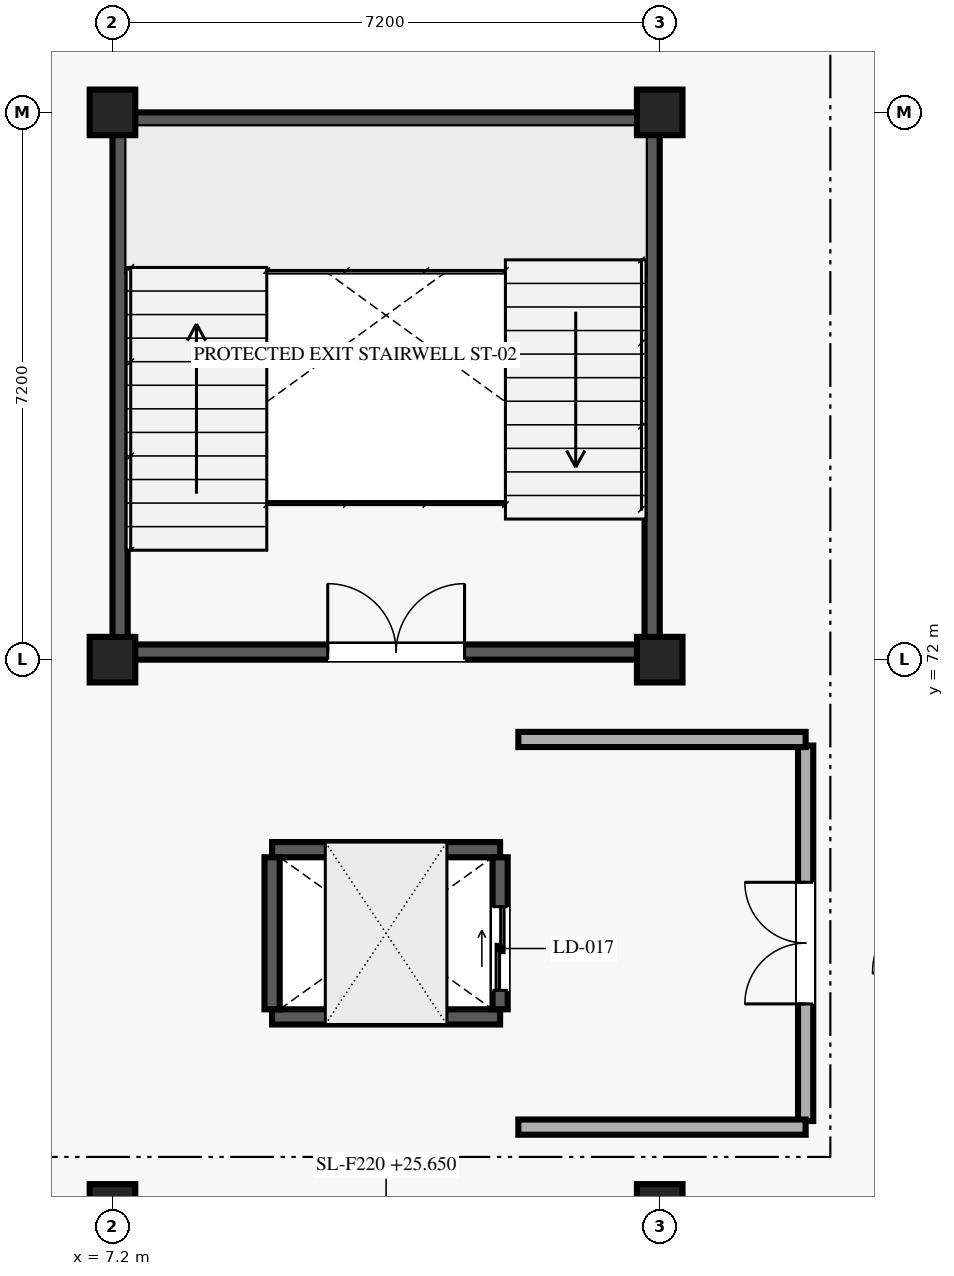
"""IFC4 building model, lengths in metres.
Left out: names, types, materials, properties, quantities, classifications, styles, units other than length and angle.
Written with IfcOpenShell. Run it as: python <this file> out.ifc"""

import sys

from ifc_helpers import new_model, si_unit, direction, frame, frame_2d, origin, origin_2d, place, context, subcontext, project, spatial, rectangle, extrude, element, fill, save


model = new_model("IFC4")
c1 = context("Model", 3, precision=1e-05, world=origin(), true_north=direction((0.0, 1.0)))
c2 = subcontext(c1, "Body", "Model", "MODEL_VIEW")
j1 = project(units=[si_unit("LENGTHUNIT", "METRE"), si_unit("PLANEANGLEUNIT", "RADIAN")], contexts=[c1])
p1 = place(None, origin())
s1 = spatial("IfcSite", under=j1, at=p1, CompositionType="ELEMENT")
p2 = place(p1, origin())
s2 = spatial("IfcBuilding", under=s1, at=p2, CompositionType="ELEMENT")
p3 = place(p2, frame((0.0, 0.0, 25.65)))
s3 = spatial("IfcBuildingStorey", under=s2, at=p3, CompositionType="ELEMENT", Elevation=25.65)
for number, where, z_axis, x_axis in (
    (1, (7.2, 64.8, 0.0), (0.0, 0.0, 1.0), (1.0, 0.0, 0.0)),
    (2, (7.2, 72.0, 0.0), (0.0, 0.0, 1.0), (1.0, 0.0, 0.0)),
    (3, (7.2, 79.2, 0.0), (0.0, 0.0, 1.0), (1.0, 0.0, 0.0)),
    (4, (14.4, 64.8, 0.0), (0.0, 0.0, 1.0), (1.0, 0.0, 0.0)),
    (5, (14.4, 72.0, 0.0), (0.0, 0.0, 1.0), (1.0, 0.0, 0.0)),
    (6, (14.4, 79.2, 0.0), (0.0, 0.0, 1.0), (1.0, 0.0, 0.0)),
):
    element("IfcColumn", number, at=place(p3, frame(where, z_axis=z_axis, x_axis=x_axis)), inside=s3, PredefinedType="COLUMN", context=c2, shape_type="SweptSolid", body=[
        extrude(rectangle(XDim=0.6, YDim=0.6, at=origin_2d()), origin(), (0.0, 0.0, 1.0), 4.05),
    ])
p4 = place(p3, frame((7.4, 72.1, 0.0), z_axis=(0.0, 0.0, 1.0), x_axis=(1.0, 0.0, 0.0)))
e7 = element("IfcWall", 7, at=p4, inside=s3, PredefinedType="SHEAR", context=c2, shape_type="SweptSolid", body=[
    extrude(rectangle(XDim=6.8, YDim=0.2, at=frame_2d((3.4, 0.0))), origin(), (0.0, 0.0, 1.0), 3.83),
])
p5 = place(p4, frame((2.632, 0.0, 0.0)))
e8 = element("IfcOpeningElement", 8, at=p5, cuts=e7, PredefinedType="OPENING", context=c2, shape_type="SweptSolid", body=[
    extrude(rectangle(XDim=1.8, YDim=2.2, at=frame_2d((0.9, 1.1))), frame((0.0, 0.11, 0.0), z_axis=(0.0, -1.0, 0.0), x_axis=(1.0, 0.0, 0.0)), (0.0, 0.0, 1.0), 0.22),
])
for number, where, z_axis, x_axis in (
    (9, (7.4, 79.1, 0.0), (0.0, 0.0, 1.0), (1.0, 0.0, 0.0)),
    (10, (7.3, 72.2, 0.0), (0.0, 0.0, 1.0), (0.0, 1.0, 0.0)),
    (11, (14.3, 72.2, 0.0), (0.0, 0.0, 1.0), (0.0, 1.0, 0.0)),
):
    element("IfcWall", number, at=place(p3, frame(where, z_axis=z_axis, x_axis=x_axis)), inside=s3, PredefinedType="SHEAR", context=c2, shape_type="SweptSolid", body=[
        extrude(rectangle(XDim=6.8, YDim=0.2, at=frame_2d((3.4, 0.0))), origin(), (0.0, 0.0, 1.0), 3.83),
    ])
for number, where, z_axis, x_axis in (
    (12, (9.3, 67.3, 0.0), (0.0, 0.0, 1.0), (1.0, 0.0, 0.0)),
    (13, (9.3, 69.5, 0.0), (0.0, 0.0, 1.0), (1.0, 0.0, 0.0)),
):
    element("IfcWall", number, at=place(p3, frame(where, z_axis=z_axis, x_axis=x_axis)), inside=s3, PredefinedType="SHEAR", context=c2, shape_type="SweptSolid", body=[
        extrude(rectangle(XDim=3.0, YDim=0.2, at=frame_2d((1.5, 0.0))), origin(), (0.0, 0.0, 1.0), 3.83),
    ])
p6 = place(p3, frame((9.3, 67.4, 0.0), z_axis=(0.0, 0.0, 1.0), x_axis=(0.0, 1.0, 0.0)))
e14 = element("IfcWall", 14, at=p6, inside=s3, PredefinedType="SHEAR", context=c2, shape_type="SweptSolid", body=[
    extrude(rectangle(XDim=2.0, YDim=0.2, at=frame_2d((1.0, 0.0))), origin(), (0.0, 0.0, 1.0), 3.83),
])
p7 = place(p3, frame((12.3, 67.4, 0.0), z_axis=(0.0, 0.0, 1.0), x_axis=(0.0, 1.0, 0.0)))
e15 = element("IfcWall", 15, at=p7, inside=s3, PredefinedType="SHEAR", context=c2, shape_type="SweptSolid", body=[
    extrude(rectangle(XDim=2.0, YDim=0.2, at=frame_2d((1.0, 0.0))), origin(), (0.0, 0.0, 1.0), 3.83),
])
p8 = place(p7, frame((0.25, 0.0, 0.0)))
e16 = element("IfcOpeningElement", 16, at=p8, cuts=e15, PredefinedType="OPENING", context=c2, shape_type="SweptSolid", body=[
    extrude(rectangle(XDim=1.1, YDim=2.15, at=frame_2d((0.55, 1.075))), frame((0.0, 0.11, 0.0), z_axis=(0.0, -1.0, 0.0), x_axis=(1.0, 0.0, 0.0)), (0.0, 0.0, 1.0), 0.22),
])
p9 = place(p3, frame((16.32, 65.93, 0.0), z_axis=(0.0, 0.0, 1.0), x_axis=(0.0, 1.0, 0.0)))
e17 = element("IfcWall", 17, at=p9, inside=s3, PredefinedType="SOLIDWALL", context=c2, shape_type="SweptSolid", body=[
    extrude(rectangle(XDim=4.94, YDim=0.2, at=frame_2d((2.47, 0.0))), origin(), (0.0, 0.0, 1.0), 3.83),
])
p10 = place(p9, frame((1.541, 0.0, 0.0)))
e18 = element("IfcOpeningElement", 18, at=p10, cuts=e17, PredefinedType="OPENING", context=c2, shape_type="SweptSolid", body=[
    extrude(rectangle(XDim=1.6, YDim=2.2, at=frame_2d((0.8, 1.1))), frame((0.0, 0.11, 0.0), z_axis=(0.0, -1.0, 0.0), x_axis=(1.0, 0.0, 0.0)), (0.0, 0.0, 1.0), 0.22),
])
for number, where, z_axis, x_axis in (
    (19, (12.54, 65.85, 0.0), (0.0, 0.0, 1.0), (1.0, 0.0, 0.0)),
    (20, (12.54, 70.95, 0.0), (0.0, 0.0, 1.0), (1.0, 0.0, 0.0)),
):
    element("IfcWall", number, at=place(p3, frame(where, z_axis=z_axis, x_axis=x_axis)), inside=s3, PredefinedType="SOLIDWALL", context=c2, shape_type="SweptSolid", body=[
        extrude(rectangle(XDim=3.78, YDim=0.2, at=frame_2d((1.89, 0.0))), origin(), (0.0, 0.0, 1.0), 3.83),
    ])
p11 = place(p5, origin())
e21 = element("IfcDoor", 21, at=p11, inside=s3, OperationType="DOUBLE_DOOR_SINGLE_SWING", PredefinedType="DOOR", context=c2, shape_type="SweptSolid", body=[
    extrude(rectangle(XDim=1.8, YDim=2.2, at=frame_2d((0.9, 1.1))), frame((0.0, 0.025, 0.0), z_axis=(0.0, -1.0, 0.0), x_axis=(1.0, 0.0, 0.0)), (0.0, 0.0, 1.0), 0.05),
])
fill(e8, e21)
p12 = place(p8, origin())
e22 = element("IfcDoor", 22, at=p12, inside=s3, OperationType="DOUBLE_DOOR_SLIDING", PredefinedType="DOOR", context=c2, shape_type="SweptSolid", body=[
    extrude(rectangle(XDim=1.1, YDim=2.15, at=frame_2d((0.55, 1.075))), frame((0.0, 0.025, 0.0), z_axis=(0.0, -1.0, 0.0), x_axis=(1.0, 0.0, 0.0)), (0.0, 0.0, 1.0), 0.05),
])
fill(e16, e22)
p13 = place(p10, origin())
e23 = element("IfcDoor", 23, at=p13, inside=s3, OperationType="DOUBLE_DOOR_SINGLE_SWING", PredefinedType="DOOR", context=c2, shape_type="SweptSolid", body=[
    extrude(rectangle(XDim=1.6, YDim=2.2, at=frame_2d((0.8, 1.1))), frame((0.0, 0.025, 0.0), z_axis=(0.0, -1.0, 0.0), x_axis=(1.0, 0.0, 0.0)), (0.0, 0.0, 1.0), 0.05),
])
fill(e18, e23)
save(model, sys.argv[1])
